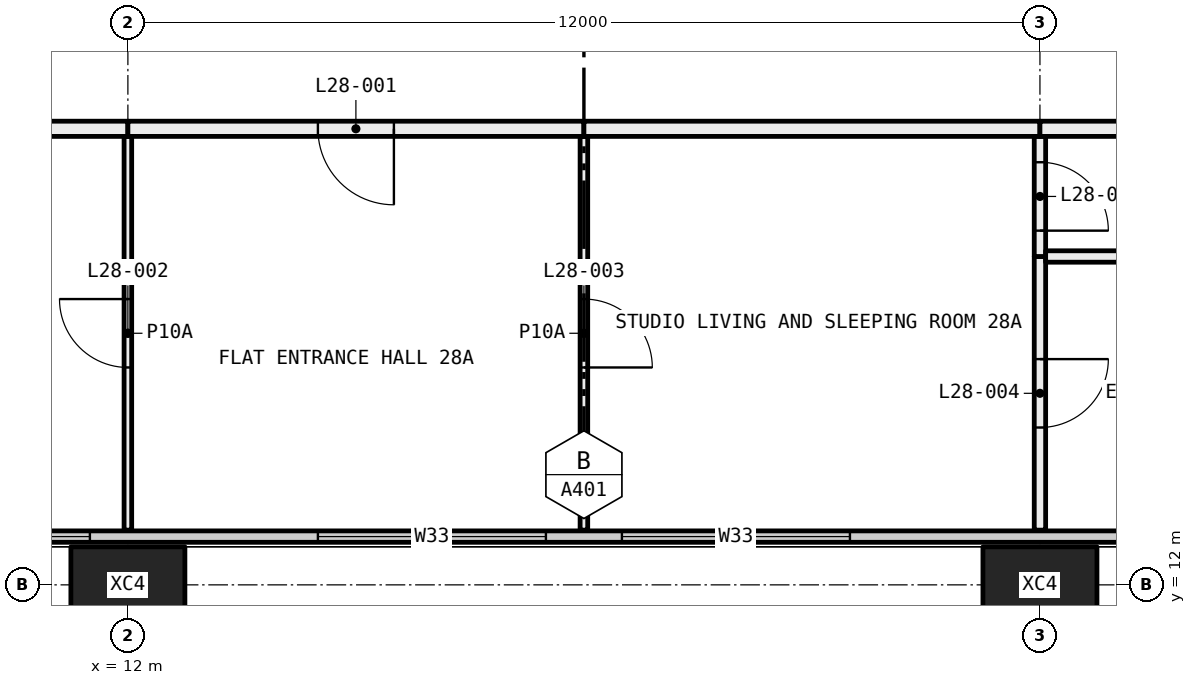
"""IFC4 building model, lengths in metres.
Left out: names, types, materials, properties, quantities, classifications, styles, units other than length and angle.
Written with IfcOpenShell. Run it as: python <this file> out.ifc"""

import sys

from ifc_helpers import new_model, si_unit, direction, frame, frame_2d, origin, origin_2d, place, context, subcontext, project, spatial, rectangle, hollow_rectangle, extrude, element, fill, save


model = new_model("IFC4")
c1 = context("Model", 3, precision=1e-05, world=origin(), true_north=direction((0.0, 1.0)))
c2 = subcontext(c1, "Body", "Model", "MODEL_VIEW")
j1 = project(units=[si_unit("LENGTHUNIT", "METRE"), si_unit("PLANEANGLEUNIT", "RADIAN")], contexts=[c1])
p1 = place(None, origin())
s1 = spatial("IfcSite", under=j1, at=p1, CompositionType="ELEMENT")
p2 = place(p1, origin())
s2 = spatial("IfcBuilding", under=s1, at=p2, CompositionType="ELEMENT")
p3 = place(p2, frame((0.0, 0.0, 110.4)))
s3 = spatial("IfcBuildingStorey", under=s2, at=p3, CompositionType="ELEMENT", Elevation=110.4)
for number, where, z_axis, x_axis in (
    (1, (12.0, 12.0, -0.4), (0.0, 0.0, 1.0), (1.0, 0.0, 0.0)),
    (2, (24.0, 12.0, -0.4), (0.0, 0.0, 1.0), (1.0, 0.0, 0.0)),
):
    element("IfcColumn", number, at=place(p3, frame(where, z_axis=z_axis, x_axis=x_axis)), inside=s3, PredefinedType="COLUMN", context=c2, shape_type="SweptSolid", body=[
        extrude(hollow_rectangle(XDim=1.5, YDim=1.0, WallThickness=0.06, at=origin_2d()), origin(), (0.0, 0.0, 1.0), 3.45),
    ])
p4 = place(p3, frame((6.56, 12.635, 0.0), z_axis=(0.0, 0.0, 1.0), x_axis=(1.0, 0.0, 0.0)))
e3 = element("IfcWall", 3, at=p4, inside=s3, PredefinedType="ELEMENTEDWALL", context=c2, shape_type="SweptSolid", body=[
    extrude(rectangle(XDim=58.88, YDim=0.15, at=frame_2d((29.44, 0.0))), origin(), (0.0, 0.0, 1.0), 3.05),
])
p5 = place(p4, frame((0.44, 0.0, 0.45)))
e4 = element("IfcOpeningElement", 4, at=p5, cuts=e3, PredefinedType="OPENING", context=c2, shape_type="SweptSolid", body=[
    extrude(rectangle(XDim=4.5, YDim=2.55, at=frame_2d((2.25, 1.275))), frame((0.0, 0.085, 0.0), z_axis=(0.0, -1.0, 0.0), x_axis=(1.0, 0.0, 0.0)), (0.0, 0.0, 1.0), 0.17),
])
p6 = place(p4, frame((7.94, 0.0, 0.45)))
e5 = element("IfcOpeningElement", 5, at=p6, cuts=e3, PredefinedType="OPENING", context=c2, shape_type="SweptSolid", body=[
    extrude(rectangle(XDim=3.0, YDim=2.55, at=frame_2d((1.5, 1.275))), frame((0.0, 0.085, 0.0), z_axis=(0.0, -1.0, 0.0), x_axis=(1.0, 0.0, 0.0)), (0.0, 0.0, 1.0), 0.17),
])
p7 = place(p4, frame((11.94, 0.0, 0.45)))
e6 = element("IfcOpeningElement", 6, at=p7, cuts=e3, PredefinedType="OPENING", context=c2, shape_type="SweptSolid", body=[
    extrude(rectangle(XDim=3.0, YDim=2.55, at=frame_2d((1.5, 1.275))), frame((0.0, 0.085, 0.0), z_axis=(0.0, -1.0, 0.0), x_axis=(1.0, 0.0, 0.0)), (0.0, 0.0, 1.0), 0.17),
])
p8 = place(p4, frame((19.94, 0.0, 0.45)))
e7 = element("IfcOpeningElement", 7, at=p8, cuts=e3, PredefinedType="OPENING", context=c2, shape_type="SweptSolid", body=[
    extrude(rectangle(XDim=3.0, YDim=2.55, at=frame_2d((1.5, 1.275))), frame((0.0, 0.085, 0.0), z_axis=(0.0, -1.0, 0.0), x_axis=(1.0, 0.0, 0.0)), (0.0, 0.0, 1.0), 0.17),
])
p9 = place(p4, frame((23.94, 0.0, 0.45)))
e8 = element("IfcOpeningElement", 8, at=p9, cuts=e3, PredefinedType="OPENING", context=c2, shape_type="SweptSolid", body=[
    extrude(rectangle(XDim=2.0, YDim=2.55, at=frame_2d((1.0, 1.275))), frame((0.0, 0.085, 0.0), z_axis=(0.0, -1.0, 0.0), x_axis=(1.0, 0.0, 0.0)), (0.0, 0.0, 1.0), 0.17),
])
p10 = place(p4, frame((31.94, 0.0, 0.45)))
e9 = element("IfcOpeningElement", 9, at=p10, cuts=e3, PredefinedType="OPENING", context=c2, shape_type="SweptSolid", body=[
    extrude(rectangle(XDim=3.0, YDim=2.55, at=frame_2d((1.5, 1.275))), frame((0.0, 0.085, 0.0), z_axis=(0.0, -1.0, 0.0), x_axis=(1.0, 0.0, 0.0)), (0.0, 0.0, 1.0), 0.17),
])
p11 = place(p4, frame((35.94, 0.0, 0.45)))
e10 = element("IfcOpeningElement", 10, at=p11, cuts=e3, PredefinedType="OPENING", context=c2, shape_type="SweptSolid", body=[
    extrude(rectangle(XDim=3.0, YDim=2.55, at=frame_2d((1.5, 1.275))), frame((0.0, 0.085, 0.0), z_axis=(0.0, -1.0, 0.0), x_axis=(1.0, 0.0, 0.0)), (0.0, 0.0, 1.0), 0.17),
])
p12 = place(p4, frame((43.94, 0.0, 0.45)))
e11 = element("IfcOpeningElement", 11, at=p12, cuts=e3, PredefinedType="OPENING", context=c2, shape_type="SweptSolid", body=[
    extrude(rectangle(XDim=3.0, YDim=2.55, at=frame_2d((1.5, 1.275))), frame((0.0, 0.085, 0.0), z_axis=(0.0, -1.0, 0.0), x_axis=(1.0, 0.0, 0.0)), (0.0, 0.0, 1.0), 0.17),
])
p13 = place(p4, frame((47.94, 0.0, 0.45)))
e12 = element("IfcOpeningElement", 12, at=p13, cuts=e3, PredefinedType="OPENING", context=c2, shape_type="SweptSolid", body=[
    extrude(rectangle(XDim=2.0, YDim=2.55, at=frame_2d((1.0, 1.275))), frame((0.0, 0.085, 0.0), z_axis=(0.0, -1.0, 0.0), x_axis=(1.0, 0.0, 0.0)), (0.0, 0.0, 1.0), 0.17),
])
p14 = place(p4, frame((53.94, 0.0, 0.45)))
e13 = element("IfcOpeningElement", 13, at=p14, cuts=e3, PredefinedType="OPENING", context=c2, shape_type="SweptSolid", body=[
    extrude(rectangle(XDim=4.5, YDim=2.55, at=frame_2d((2.25, 1.275))), frame((0.0, 0.085, 0.0), z_axis=(0.0, -1.0, 0.0), x_axis=(1.0, 0.0, 0.0)), (0.0, 0.0, 1.0), 0.17),
])
p15 = place(p3, frame((12.0, 12.72, 0.0), z_axis=(0.0, 0.0, 1.0), x_axis=(0.0, 1.0, 0.0)))
e14 = element("IfcWall", 14, at=p15, inside=s3, PredefinedType="PARTITIONING", context=c2, shape_type="SweptSolid", body=[
    extrude(rectangle(XDim=5.18, YDim=0.1, at=frame_2d((2.59, 0.0))), origin(), (0.0, 0.0, 1.0), 3.05),
])
p16 = place(p15, frame((2.14, 0.0, 0.0)))
e15 = element("IfcOpeningElement", 15, at=p16, cuts=e14, PredefinedType="OPENING", context=c2, shape_type="SweptSolid", body=[
    extrude(rectangle(XDim=0.9, YDim=2.1, at=frame_2d((0.45, 1.05))), frame((0.0, 0.06, 0.0), z_axis=(0.0, -1.0, 0.0), x_axis=(1.0, 0.0, 0.0)), (0.0, 0.0, 1.0), 0.12),
])
p17 = place(p3, frame((12.0, 18.0, 0.0), z_axis=(0.0, 0.0, 1.0), x_axis=(-1.0, 0.0, 0.0)))
e16 = element("IfcWall", 16, at=p17, inside=s3, PredefinedType="PARTITIONING", context=c2, shape_type="SweptSolid", body=[
    extrude(rectangle(XDim=1.9, YDim=0.2, at=frame_2d((0.95, 0.0))), origin(), (0.0, 0.0, 1.0), 3.05),
])
p18 = place(p3, frame((18.0, 12.72, 0.0), z_axis=(0.0, 0.0, 1.0), x_axis=(0.0, 1.0, 0.0)))
e17 = element("IfcWall", 17, at=p18, inside=s3, PredefinedType="PARTITIONING", context=c2, shape_type="SweptSolid", body=[
    extrude(rectangle(XDim=5.18, YDim=0.1, at=frame_2d((2.59, 0.0))), origin(), (0.0, 0.0, 1.0), 3.05),
])
p19 = place(p18, frame((2.14, 0.0, 0.0)))
e18 = element("IfcOpeningElement", 18, at=p19, cuts=e17, PredefinedType="OPENING", context=c2, shape_type="SweptSolid", body=[
    extrude(rectangle(XDim=0.9, YDim=2.1, at=frame_2d((0.45, 1.05))), frame((0.0, 0.06, 0.0), z_axis=(0.0, -1.0, 0.0), x_axis=(1.0, 0.0, 0.0)), (0.0, 0.0, 1.0), 0.12),
])
p20 = place(p3, frame((18.0, 18.0, 0.0), z_axis=(0.0, 0.0, 1.0), x_axis=(-1.0, 0.0, 0.0)))
e19 = element("IfcWall", 19, at=p20, inside=s3, PredefinedType="PARTITIONING", context=c2, shape_type="SweptSolid", body=[
    extrude(rectangle(XDim=6.0, YDim=0.2, at=frame_2d((3.0, 0.0))), origin(), (0.0, 0.0, 1.0), 3.05),
])
p21 = place(p20, frame((2.5, 0.0, 0.0)))
e20 = element("IfcOpeningElement", 20, at=p21, cuts=e19, PredefinedType="OPENING", context=c2, shape_type="SweptSolid", body=[
    extrude(rectangle(XDim=1.0, YDim=2.1, at=frame_2d((0.5, 1.05))), frame((0.0, 0.11, 0.0), z_axis=(0.0, -1.0, 0.0), x_axis=(1.0, 0.0, 0.0)), (0.0, 0.0, 1.0), 0.22),
])
p22 = place(p3, frame((24.0, 12.72, 0.0), z_axis=(0.0, 0.0, 1.0), x_axis=(0.0, 1.0, 0.0)))
e21 = element("IfcWall", 21, at=p22, inside=s3, PredefinedType="PARTITIONING", context=c2, shape_type="SweptSolid", body=[
    extrude(rectangle(XDim=3.6, YDim=0.15, at=frame_2d((1.8, 0.0))), origin(), (0.0, 0.0, 1.0), 3.05),
])
p23 = place(p22, frame((1.35, 0.0, 0.0)))
e22 = element("IfcOpeningElement", 22, at=p23, cuts=e21, PredefinedType="OPENING", context=c2, shape_type="SweptSolid", body=[
    extrude(rectangle(XDim=0.9, YDim=2.1, at=frame_2d((0.45, 1.05))), frame((0.0, 0.085, 0.0), z_axis=(0.0, -1.0, 0.0), x_axis=(1.0, 0.0, 0.0)), (0.0, 0.0, 1.0), 0.17),
])
p24 = place(p3, frame((24.0, 16.32, 0.0), z_axis=(0.0, 0.0, 1.0), x_axis=(0.0, 1.0, 0.0)))
e23 = element("IfcWall", 23, at=p24, inside=s3, PredefinedType="PARTITIONING", context=c2, shape_type="SweptSolid", body=[
    extrude(rectangle(XDim=1.58, YDim=0.15, at=frame_2d((0.79, 0.0))), origin(), (0.0, 0.0, 1.0), 3.05),
])
p25 = place(p24, frame((0.34, 0.0, 0.0)))
e24 = element("IfcOpeningElement", 24, at=p25, cuts=e23, PredefinedType="OPENING", context=c2, shape_type="SweptSolid", body=[
    extrude(rectangle(XDim=0.9, YDim=2.1, at=frame_2d((0.45, 1.05))), frame((0.0, 0.085, 0.0), z_axis=(0.0, -1.0, 0.0), x_axis=(1.0, 0.0, 0.0)), (0.0, 0.0, 1.0), 0.17),
])
p26 = place(p3, frame((24.0, 18.0, 0.0), z_axis=(0.0, 0.0, 1.0), x_axis=(-1.0, 0.0, 0.0)))
e25 = element("IfcWall", 25, at=p26, inside=s3, PredefinedType="PARTITIONING", context=c2, shape_type="SweptSolid", body=[
    extrude(rectangle(XDim=6.0, YDim=0.2, at=frame_2d((3.0, 0.0))), origin(), (0.0, 0.0, 1.0), 3.05),
])
p27 = place(p3, frame((29.9, 16.32, 0.0), z_axis=(0.0, 0.0, 1.0), x_axis=(-1.0, 0.0, 0.0)))
e26 = element("IfcWall", 26, at=p27, inside=s3, PredefinedType="PARTITIONING", context=c2, shape_type="SweptSolid", body=[
    extrude(rectangle(XDim=5.825, YDim=0.15, at=frame_2d((2.913, 0.0))), origin(), (0.0, 0.0, 1.0), 3.05),
])
p28 = place(p3, frame((25.9, 18.0, 0.0), z_axis=(0.0, 0.0, 1.0), x_axis=(-1.0, 0.0, 0.0)))
e27 = element("IfcWall", 27, at=p28, inside=s3, PredefinedType="PARTITIONING", context=c2, shape_type="SweptSolid", body=[
    extrude(rectangle(XDim=1.9, YDim=0.2, at=frame_2d((0.95, 0.0))), origin(), (0.0, 0.0, 1.0), 3.05),
])
p29 = place(p5, origin())
e28 = element("IfcWindow", 28, at=p29, inside=s3, PartitioningType="SINGLE_PANEL", PredefinedType="WINDOW", context=c2, shape_type="SweptSolid", body=[
    extrude(rectangle(XDim=4.5, YDim=2.55, at=frame_2d((2.25, 1.275))), frame((0.0, 0.03, 0.0), z_axis=(0.0, -1.0, 0.0), x_axis=(1.0, 0.0, 0.0)), (0.0, 0.0, 1.0), 0.06),
])
fill(e4, e28)
p30 = place(p6, origin())
e29 = element("IfcWindow", 29, at=p30, inside=s3, PartitioningType="SINGLE_PANEL", PredefinedType="WINDOW", context=c2, shape_type="SweptSolid", body=[
    extrude(rectangle(XDim=3.0, YDim=2.55, at=frame_2d((1.5, 1.275))), frame((0.0, 0.03, 0.0), z_axis=(0.0, -1.0, 0.0), x_axis=(1.0, 0.0, 0.0)), (0.0, 0.0, 1.0), 0.06),
])
fill(e5, e29)
p31 = place(p7, origin())
e30 = element("IfcWindow", 30, at=p31, inside=s3, PartitioningType="SINGLE_PANEL", PredefinedType="WINDOW", context=c2, shape_type="SweptSolid", body=[
    extrude(rectangle(XDim=3.0, YDim=2.55, at=frame_2d((1.5, 1.275))), frame((0.0, 0.03, 0.0), z_axis=(0.0, -1.0, 0.0), x_axis=(1.0, 0.0, 0.0)), (0.0, 0.0, 1.0), 0.06),
])
fill(e6, e30)
p32 = place(p21, origin())
e31 = element("IfcDoor", 31, at=p32, inside=s3, OperationType="SINGLE_SWING_RIGHT", PredefinedType="DOOR", context=c2, shape_type="SweptSolid", body=[
    extrude(rectangle(XDim=1.0, YDim=2.1, at=frame_2d((0.5, 1.05))), frame((0.0, 0.025, 0.0), z_axis=(0.0, -1.0, 0.0), x_axis=(1.0, 0.0, 0.0)), (0.0, 0.0, 1.0), 0.05),
])
fill(e20, e31)
p33 = place(p16, origin())
e32 = element("IfcDoor", 32, at=p33, inside=s3, OperationType="SINGLE_SWING_LEFT", PredefinedType="DOOR", context=c2, shape_type="SweptSolid", body=[
    extrude(rectangle(XDim=0.9, YDim=2.1, at=frame_2d((0.45, 1.05))), frame((0.0, 0.025, 0.0), z_axis=(0.0, -1.0, 0.0), x_axis=(1.0, 0.0, 0.0)), (0.0, 0.0, 1.0), 0.05),
])
fill(e15, e32)
p34 = place(p19, frame((0.9, 0.0, 0.0), x_axis=(-1.0, 0.0, 0.0)))
e33 = element("IfcDoor", 33, at=p34, inside=s3, OperationType="SINGLE_SWING_LEFT", PredefinedType="DOOR", context=c2, shape_type="SweptSolid", body=[
    extrude(rectangle(XDim=0.9, YDim=2.1, at=frame_2d((0.45, 1.05))), frame((0.0, 0.025, 0.0), z_axis=(0.0, -1.0, 0.0), x_axis=(1.0, 0.0, 0.0)), (0.0, 0.0, 1.0), 0.05),
])
fill(e18, e33)
p35 = place(p23, frame((0.9, 0.0, 0.0), x_axis=(-1.0, 0.0, 0.0)))
e34 = element("IfcDoor", 34, at=p35, inside=s3, OperationType="SINGLE_SWING_RIGHT", PredefinedType="DOOR", context=c2, shape_type="SweptSolid", body=[
    extrude(rectangle(XDim=0.9, YDim=2.1, at=frame_2d((0.45, 1.05))), frame((0.0, 0.025, 0.0), z_axis=(0.0, -1.0, 0.0), x_axis=(1.0, 0.0, 0.0)), (0.0, 0.0, 1.0), 0.05),
])
fill(e22, e34)
p36 = place(p25, frame((0.9, 0.0, 0.0), x_axis=(-1.0, 0.0, 0.0)))
e35 = element("IfcDoor", 35, at=p36, inside=s3, OperationType="SINGLE_SWING_LEFT", PredefinedType="DOOR", context=c2, shape_type="SweptSolid", body=[
    extrude(rectangle(XDim=0.9, YDim=2.1, at=frame_2d((0.45, 1.05))), frame((0.0, 0.025, 0.0), z_axis=(0.0, -1.0, 0.0), x_axis=(1.0, 0.0, 0.0)), (0.0, 0.0, 1.0), 0.05),
])
fill(e24, e35)
save(model, sys.argv[1])
